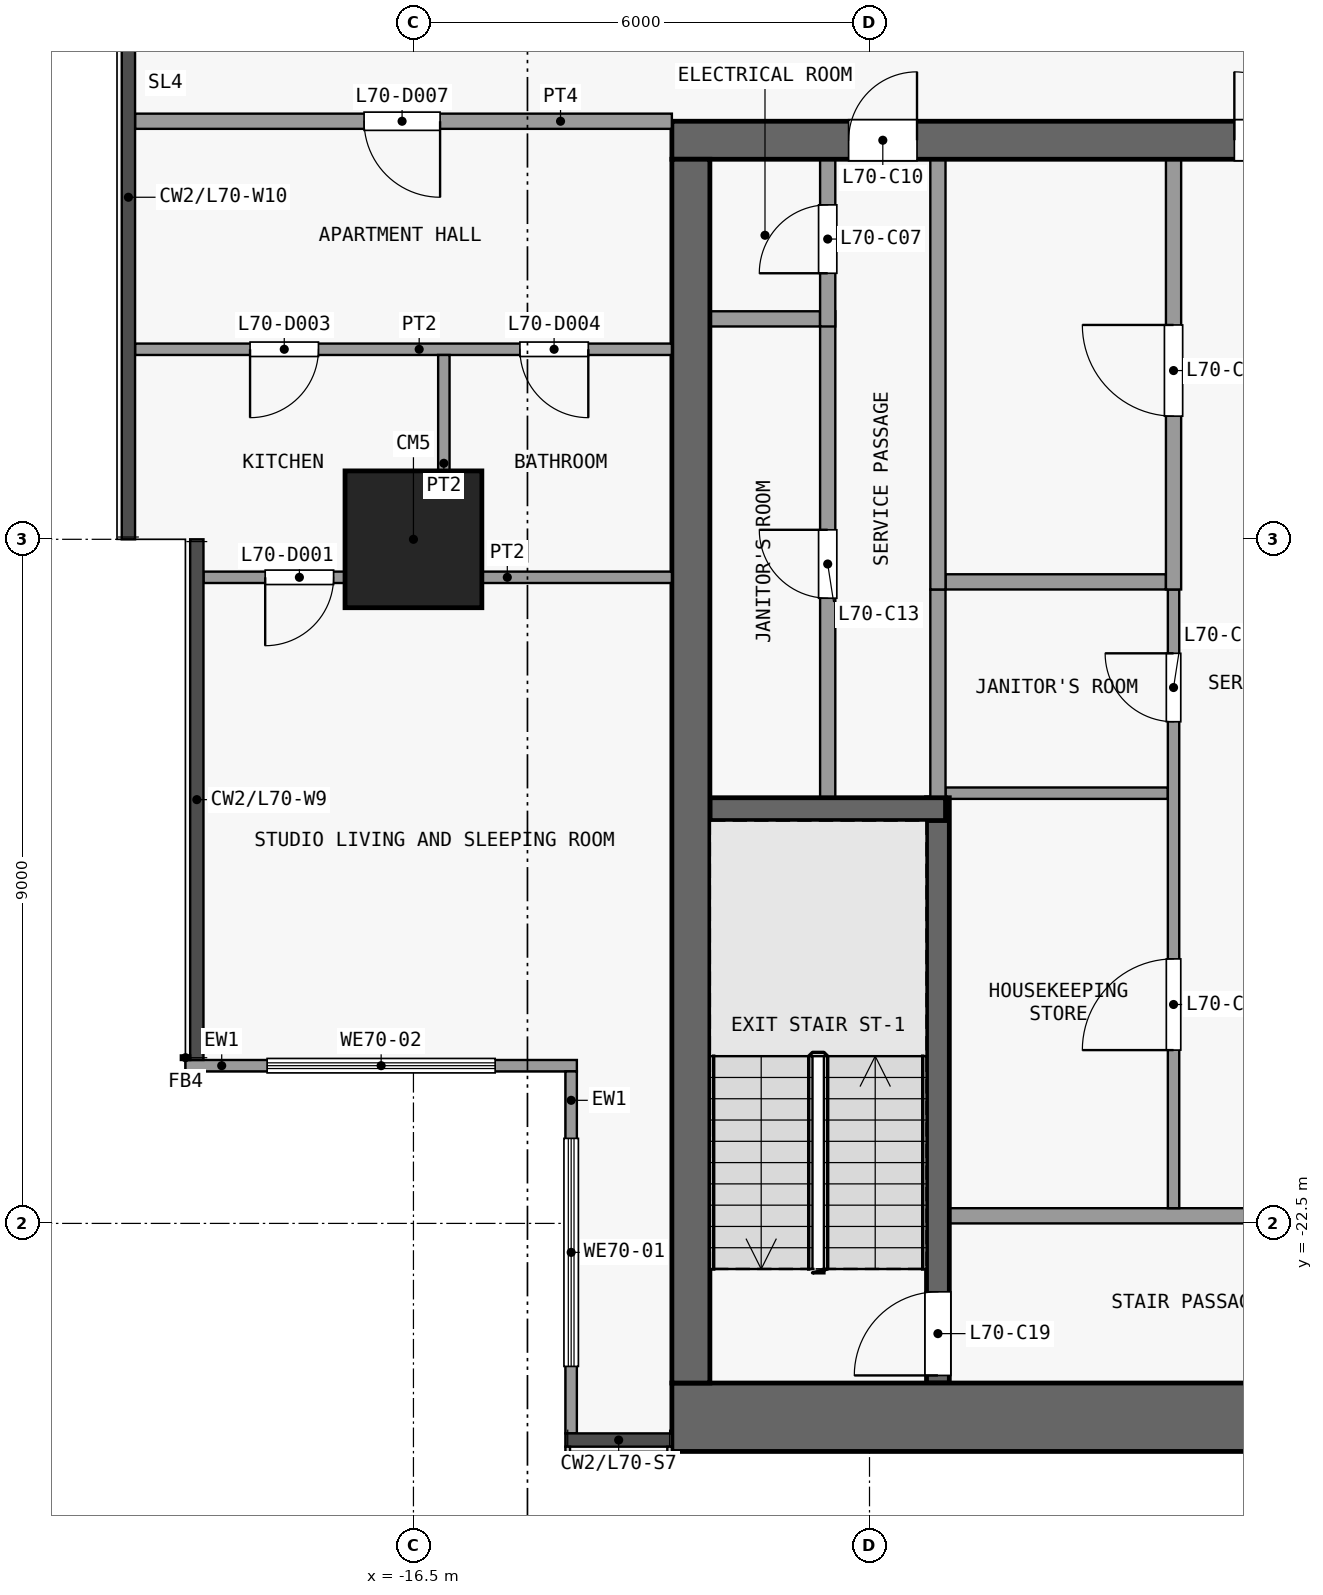
"""IFC4 building model, lengths in metres.
Left out: names, types, materials, properties, quantities, classifications, styles, units other than length and angle.
Written with IfcOpenShell. Run it as: python <this file> out.ifc"""

import sys

from ifc_helpers import new_model, si_unit, direction, frame, frame_2d, origin, origin_2d, place, context, subcontext, project, spatial, rectangle, extrude, element, fill, save


model = new_model("IFC4")
c1 = context("Model", 3, precision=1e-05, world=origin(), true_north=direction((0.0, 1.0)))
c2 = subcontext(c1, "Body", "Model", "MODEL_VIEW")
j1 = project(units=[si_unit("LENGTHUNIT", "METRE"), si_unit("PLANEANGLEUNIT", "RADIAN")], contexts=[c1])
p1 = place(None, origin())
s1 = spatial("IfcSite", under=j1, at=p1, CompositionType="ELEMENT")
p2 = place(p1, origin())
s2 = spatial("IfcBuilding", under=s1, at=p2, CompositionType="ELEMENT")
p3 = place(p2, frame((0.0, 0.0, 277.1)))
s3 = spatial("IfcBuildingStorey", under=s2, at=p3, CompositionType="ELEMENT", Elevation=277.1)
p4 = place(p3, frame((-16.5, -13.5, 0.0), z_axis=(0.0, 0.0, 1.0), x_axis=(1.0, 0.0, 0.0)))
e1 = element("IfcColumn", 1, at=p4, inside=s3, PredefinedType="COLUMN", context=c2, shape_type="SweptSolid", body=[
    extrude(rectangle(XDim=1.8, YDim=1.8, at=origin_2d()), origin(), (0.0, 0.0, 1.0), 3.6),
])
p5 = place(p3, frame((-13.1, -25.05, 0.0), z_axis=(0.0, 0.0, 1.0), x_axis=(1.0, 0.0, 0.0)))
e2 = element("IfcWall", 2, at=p5, inside=s3, PredefinedType="SHEAR", context=c2, shape_type="SweptSolid", body=[
    extrude(rectangle(XDim=26.2, YDim=0.9, at=frame_2d((13.1, 0.0))), origin(), (0.0, 0.0, 1.0), 3.3),
])
p6 = place(p3, frame((-13.1, -8.25, 0.0), z_axis=(0.0, 0.0, 1.0), x_axis=(1.0, 0.0, 0.0)))
e3 = element("IfcWall", 3, at=p6, inside=s3, PredefinedType="SHEAR", context=c2, shape_type="SweptSolid", body=[
    extrude(rectangle(XDim=26.2, YDim=0.5, at=frame_2d((13.1, 0.0))), origin(), (0.0, 0.0, 1.0), 3.3),
])
p7 = place(p6, frame((7.4, 0.0, 0.0)))
e4 = element("IfcOpeningElement", 4, at=p7, cuts=e3, PredefinedType="OPENING", context=c2, shape_type="SweptSolid", body=[
    extrude(rectangle(XDim=1.8, YDim=2.1, at=frame_2d((0.9, 1.05))), frame((0.0, 0.26, 0.0), z_axis=(0.0, -1.0, 0.0), x_axis=(1.0, 0.0, 0.0)), (0.0, 0.0, 1.0), 0.52),
])
p8 = place(p6, frame((17.0, 0.0, 0.0)))
e5 = element("IfcOpeningElement", 5, at=p8, cuts=e3, PredefinedType="OPENING", context=c2, shape_type="SweptSolid", body=[
    extrude(rectangle(XDim=1.8, YDim=2.1, at=frame_2d((0.9, 1.05))), frame((0.0, 0.26, 0.0), z_axis=(0.0, -1.0, 0.0), x_axis=(1.0, 0.0, 0.0)), (0.0, 0.0, 1.0), 0.52),
])
p9 = place(p6, frame((2.325, 0.0, 0.0)))
e6 = element("IfcOpeningElement", 6, at=p9, cuts=e3, PredefinedType="OPENING", context=c2, shape_type="SweptSolid", body=[
    extrude(rectangle(XDim=0.9, YDim=2.1, at=frame_2d((0.45, 1.05))), frame((0.0, 0.26, 0.0), z_axis=(0.0, -1.0, 0.0), x_axis=(1.0, 0.0, 0.0)), (0.0, 0.0, 1.0), 0.52),
])
p10 = place(p6, frame((22.975, 0.0, 0.0)))
e7 = element("IfcOpeningElement", 7, at=p10, cuts=e3, PredefinedType="OPENING", context=c2, shape_type="SweptSolid", body=[
    extrude(rectangle(XDim=0.9, YDim=2.1, at=frame_2d((0.45, 1.05))), frame((0.0, 0.26, 0.0), z_axis=(0.0, -1.0, 0.0), x_axis=(1.0, 0.0, 0.0)), (0.0, 0.0, 1.0), 0.52),
])
p11 = place(p3, frame((-12.85, -24.6, 0.0), z_axis=(0.0, 0.0, 1.0), x_axis=(0.0, 1.0, 0.0)))
e8 = element("IfcWall", 8, at=p11, inside=s3, PredefinedType="SHEAR", context=c2, shape_type="SweptSolid", body=[
    extrude(rectangle(XDim=16.1, YDim=0.5, at=frame_2d((8.05, 0.0))), origin(), (0.0, 0.0, 1.0), 3.3),
])
p12 = place(p3, frame((-3.25, -22.4, 0.0), z_axis=(0.0, 0.0, 1.0), x_axis=(-1.0, 0.0, 0.0)))
e9 = element("IfcWall", 9, at=p12, inside=s3, PredefinedType="PARTITIONING", context=c2, shape_type="SweptSolid", body=[
    extrude(rectangle(XDim=6.2, YDim=0.2, at=frame_2d((3.1, 0.0))), origin(), (0.0, 0.0, 1.0), 3.3),
])
p13 = place(p12, frame((0.8, 0.0, 0.0)))
e10 = element("IfcOpeningElement", 10, at=p13, cuts=e9, PredefinedType="OPENING", context=c2, shape_type="SweptSolid", body=[
    extrude(rectangle(XDim=1.5, YDim=2.1, at=frame_2d((0.75, 1.05))), frame((0.0, 0.11, 0.0), z_axis=(0.0, -1.0, 0.0), x_axis=(1.0, 0.0, 0.0)), (0.0, 0.0, 1.0), 0.22),
])
p14 = place(p3, frame((-12.6, -17.05, 0.0), z_axis=(0.0, 0.0, 1.0), x_axis=(1.0, 0.0, 0.0)))
e11 = element("IfcWall", 11, at=p14, inside=s3, PredefinedType="SHEAR", context=c2, shape_type="SweptSolid", body=[
    extrude(rectangle(XDim=3.1, YDim=0.3, at=frame_2d((1.55, 0.0))), origin(), (0.0, 0.0, 1.0), 3.3),
])
p15 = place(p3, frame((-9.5, -16.84, 0.0), z_axis=(0.0, 0.0, 1.0), x_axis=(1.0, 0.0, 0.0)))
e12 = element("IfcWall", 12, at=p15, inside=s3, PredefinedType="PARTITIONING", context=c2, shape_type="SweptSolid", body=[
    extrude(rectangle(XDim=2.925, YDim=0.15, at=frame_2d((1.462, 0.0))), origin(), (0.0, 0.0, 1.0), 3.3),
])
p16 = place(p3, frame((-9.5, -14.06, 0.0), z_axis=(0.0, 0.0, 1.0), x_axis=(1.0, 0.0, 0.0)))
e13 = element("IfcWall", 13, at=p16, inside=s3, PredefinedType="PARTITIONING", context=c2, shape_type="SweptSolid", body=[
    extrude(rectangle(XDim=2.9, YDim=0.2, at=frame_2d((1.45, 0.0))), origin(), (0.0, 0.0, 1.0), 3.3),
])
p17 = place(p3, frame((-12.6, -10.6, 0.0), z_axis=(0.0, 0.0, 1.0), x_axis=(1.0, 0.0, 0.0)))
e14 = element("IfcWall", 14, at=p17, inside=s3, PredefinedType="PARTITIONING", context=c2, shape_type="SweptSolid", body=[
    extrude(rectangle(XDim=1.45, YDim=0.2, at=frame_2d((0.725, 0.0))), origin(), (0.0, 0.0, 1.0), 3.3),
])
p18 = place(p3, frame((-11.05, -16.9, 0.0), z_axis=(0.0, 0.0, 1.0), x_axis=(0.0, 1.0, 0.0)))
e15 = element("IfcWall", 15, at=p18, inside=s3, PredefinedType="PARTITIONING", context=c2, shape_type="SweptSolid", body=[
    extrude(rectangle(XDim=6.4, YDim=0.2, at=frame_2d((3.2, 0.0))), origin(), (0.0, 0.0, 1.0), 3.3),
])
p19 = place(p18, frame((2.625, 0.0, 0.0)))
e16 = element("IfcOpeningElement", 16, at=p19, cuts=e15, PredefinedType="OPENING", context=c2, shape_type="SweptSolid", body=[
    extrude(rectangle(XDim=0.9, YDim=2.1, at=frame_2d((0.45, 1.05))), frame((0.0, 0.11, 0.0), z_axis=(0.0, -1.0, 0.0), x_axis=(1.0, 0.0, 0.0)), (0.0, 0.0, 1.0), 0.22),
])
p20 = place(p3, frame((-11.05, -10.7, 0.0), z_axis=(0.0, 0.0, 1.0), x_axis=(0.0, 1.0, 0.0)))
e17 = element("IfcWall", 17, at=p20, inside=s3, PredefinedType="PARTITIONING", context=c2, shape_type="SweptSolid", body=[
    extrude(rectangle(XDim=2.2, YDim=0.2, at=frame_2d((1.1, 0.0))), origin(), (0.0, 0.0, 1.0), 3.3),
])
p21 = place(p20, frame((0.7, 0.0, 0.0)))
e18 = element("IfcOpeningElement", 18, at=p21, cuts=e17, PredefinedType="OPENING", context=c2, shape_type="SweptSolid", body=[
    extrude(rectangle(XDim=0.9, YDim=2.1, at=frame_2d((0.45, 1.05))), frame((0.0, 0.11, 0.0), z_axis=(0.0, -1.0, 0.0), x_axis=(1.0, 0.0, 0.0)), (0.0, 0.0, 1.0), 0.22),
])
p22 = place(p3, frame((-9.6, -24.6, 0.0), z_axis=(0.0, 0.0, 1.0), x_axis=(0.0, 1.0, 0.0)))
e19 = element("IfcWall", 19, at=p22, inside=s3, PredefinedType="SHEAR", context=c2, shape_type="SweptSolid", body=[
    extrude(rectangle(XDim=7.7, YDim=0.3, at=frame_2d((3.85, 0.0))), origin(), (0.0, 0.0, 1.0), 3.3),
])
p23 = place(p22, frame((0.1, 0.0, 0.0)))
e20 = element("IfcOpeningElement", 20, at=p23, cuts=e19, PredefinedType="OPENING", context=c2, shape_type="SweptSolid", body=[
    extrude(rectangle(XDim=1.1, YDim=2.1, at=frame_2d((0.55, 1.05))), frame((0.0, 0.16, 0.0), z_axis=(0.0, -1.0, 0.0), x_axis=(1.0, 0.0, 0.0)), (0.0, 0.0, 1.0), 0.32),
])
p24 = place(p3, frame((-9.6, -16.9, 0.0), z_axis=(0.0, 0.0, 1.0), x_axis=(0.0, 1.0, 0.0)))
e21 = element("IfcWall", 21, at=p24, inside=s3, PredefinedType="PARTITIONING", context=c2, shape_type="SweptSolid", body=[
    extrude(rectangle(XDim=2.74, YDim=0.2, at=frame_2d((1.37, 0.0))), origin(), (0.0, 0.0, 1.0), 3.3),
])
p25 = place(p3, frame((-9.6, -14.16, 0.0), z_axis=(0.0, 0.0, 1.0), x_axis=(0.0, 1.0, 0.0)))
e22 = element("IfcWall", 22, at=p25, inside=s3, PredefinedType="PARTITIONING", context=c2, shape_type="SweptSolid", body=[
    extrude(rectangle(XDim=5.66, YDim=0.2, at=frame_2d((2.83, 0.0))), origin(), (0.0, 0.0, 1.0), 3.3),
])
p26 = place(p3, frame((-6.5, -22.3, 0.0), z_axis=(0.0, 0.0, 1.0), x_axis=(0.0, 1.0, 0.0)))
e23 = element("IfcWall", 23, at=p26, inside=s3, PredefinedType="PARTITIONING", context=c2, shape_type="SweptSolid", body=[
    extrude(rectangle(XDim=8.14, YDim=0.15, at=frame_2d((4.07, 0.0))), origin(), (0.0, 0.0, 1.0), 3.3),
])
p27 = place(p26, frame((2.08, 0.0, 0.0)))
e24 = element("IfcOpeningElement", 24, at=p27, cuts=e23, PredefinedType="OPENING", context=c2, shape_type="SweptSolid", body=[
    extrude(rectangle(XDim=1.2, YDim=2.1, at=frame_2d((0.6, 1.05))), frame((0.0, 0.085, 0.0), z_axis=(0.0, -1.0, 0.0), x_axis=(1.0, 0.0, 0.0)), (0.0, 0.0, 1.0), 0.17),
])
p28 = place(p26, frame((6.4, 0.0, 0.0)))
e25 = element("IfcOpeningElement", 25, at=p28, cuts=e23, PredefinedType="OPENING", context=c2, shape_type="SweptSolid", body=[
    extrude(rectangle(XDim=0.9, YDim=2.1, at=frame_2d((0.45, 1.05))), frame((0.0, 0.085, 0.0), z_axis=(0.0, -1.0, 0.0), x_axis=(1.0, 0.0, 0.0)), (0.0, 0.0, 1.0), 0.17),
])
p29 = place(p3, frame((-6.5, -14.16, 0.0), z_axis=(0.0, 0.0, 1.0), x_axis=(0.0, 1.0, 0.0)))
e26 = element("IfcWall", 26, at=p29, inside=s3, PredefinedType="PARTITIONING", context=c2, shape_type="SweptSolid", body=[
    extrude(rectangle(XDim=5.66, YDim=0.2, at=frame_2d((2.83, 0.0))), origin(), (0.0, 0.0, 1.0), 3.3),
])
p30 = place(p29, frame((2.28, 0.0, 0.0)))
e27 = element("IfcOpeningElement", 27, at=p30, cuts=e26, PredefinedType="OPENING", context=c2, shape_type="SweptSolid", body=[
    extrude(rectangle(XDim=1.2, YDim=2.1, at=frame_2d((0.6, 1.05))), frame((0.0, 0.11, 0.0), z_axis=(0.0, -1.0, 0.0), x_axis=(1.0, 0.0, 0.0)), (0.0, 0.0, 1.0), 0.22),
])
p31 = place(p3, frame((-14.425, -25.262, 0.0), z_axis=(0.0, 0.0, 1.0), x_axis=(0.0, 1.0, 0.0)))
e28 = element("IfcWall", 28, at=p31, inside=s3, PredefinedType="SOLIDWALL", context=c2, shape_type="SweptSolid", body=[
    extrude(rectangle(XDim=4.762, YDim=0.15, at=frame_2d((2.381, 0.0))), origin(), (0.0, 0.0, 1.0), 3.3),
])
p32 = place(p31, frame((0.881, 0.0, 0.9)))
e29 = element("IfcOpeningElement", 29, at=p32, cuts=e28, PredefinedType="OPENING", context=c2, shape_type="SweptSolid", body=[
    extrude(rectangle(XDim=3.0, YDim=2.4, at=frame_2d((1.5, 1.2))), frame((0.0, 0.085, 0.0), z_axis=(0.0, -1.0, 0.0), x_axis=(1.0, 0.0, 0.0)), (0.0, 0.0, 1.0), 0.17),
])
p33 = place(p3, frame((-14.35, -20.425, 0.0), z_axis=(0.0, 0.0, 1.0), x_axis=(-1.0, 0.0, 0.0)))
e30 = element("IfcWall", 30, at=p33, inside=s3, PredefinedType="SOLIDWALL", context=c2, shape_type="SweptSolid", body=[
    extrude(rectangle(XDim=5.15, YDim=0.15, at=frame_2d((2.575, 0.0))), origin(), (0.0, 0.0, 1.0), 3.3),
])
p34 = place(p33, frame((1.075, 0.0, 0.9)))
e31 = element("IfcOpeningElement", 31, at=p34, cuts=e30, PredefinedType="OPENING", context=c2, shape_type="SweptSolid", body=[
    extrude(rectangle(XDim=3.0, YDim=2.4, at=frame_2d((1.5, 1.2))), frame((0.0, 0.085, 0.0), z_axis=(0.0, -1.0, 0.0), x_axis=(1.0, 0.0, 0.0)), (0.0, 0.0, 1.0), 0.17),
])
p35 = place(p3, frame((-19.262, -14.0, 0.0), z_axis=(0.0, 0.0, 1.0), x_axis=(1.0, 0.0, 0.0)))
e32 = element("IfcWall", 32, at=p35, inside=s3, PredefinedType="PARTITIONING", context=c2, shape_type="SweptSolid", body=[
    extrude(rectangle(XDim=6.162, YDim=0.15, at=frame_2d((3.081, 0.0))), origin(), (0.0, 0.0, 1.0), 3.3),
])
p36 = place(p35, frame((0.812, 0.0, 0.0)))
e33 = element("IfcOpeningElement", 33, at=p36, cuts=e32, PredefinedType="OPENING", context=c2, shape_type="SweptSolid", body=[
    extrude(rectangle(XDim=0.9, YDim=2.1, at=frame_2d((0.45, 1.05))), frame((0.0, 0.085, 0.0), z_axis=(0.0, -1.0, 0.0), x_axis=(1.0, 0.0, 0.0)), (0.0, 0.0, 1.0), 0.17),
])
p37 = place(p3, frame((-20.163, -11.0, 0.0), z_axis=(0.0, 0.0, 1.0), x_axis=(1.0, 0.0, 0.0)))
e34 = element("IfcWall", 34, at=p37, inside=s3, PredefinedType="PARTITIONING", context=c2, shape_type="SweptSolid", body=[
    extrude(rectangle(XDim=7.062, YDim=0.15, at=frame_2d((3.531, 0.0))), origin(), (0.0, 0.0, 1.0), 3.3),
])
p38 = place(p37, frame((1.513, 0.0, 0.0)))
e35 = element("IfcOpeningElement", 35, at=p38, cuts=e34, PredefinedType="OPENING", context=c2, shape_type="SweptSolid", body=[
    extrude(rectangle(XDim=0.9, YDim=2.1, at=frame_2d((0.45, 1.05))), frame((0.0, 0.085, 0.0), z_axis=(0.0, -1.0, 0.0), x_axis=(1.0, 0.0, 0.0)), (0.0, 0.0, 1.0), 0.17),
])
p39 = place(p37, frame((5.063, 0.0, 0.0)))
e36 = element("IfcOpeningElement", 36, at=p39, cuts=e34, PredefinedType="OPENING", context=c2, shape_type="SweptSolid", body=[
    extrude(rectangle(XDim=0.9, YDim=2.1, at=frame_2d((0.45, 1.05))), frame((0.0, 0.085, 0.0), z_axis=(0.0, -1.0, 0.0), x_axis=(1.0, 0.0, 0.0)), (0.0, 0.0, 1.0), 0.17),
])
p40 = place(p3, frame((-20.163, -8.0, 0.0), z_axis=(0.0, 0.0, 1.0), x_axis=(1.0, 0.0, 0.0)))
e37 = element("IfcWall", 37, at=p40, inside=s3, PredefinedType="PARTITIONING", context=c2, shape_type="SweptSolid", body=[
    extrude(rectangle(XDim=7.062, YDim=0.2, at=frame_2d((3.531, 0.0))), origin(), (0.0, 0.0, 1.0), 3.3),
])
p41 = place(p40, frame((3.013, 0.0, 0.0)))
e38 = element("IfcOpeningElement", 38, at=p41, cuts=e37, PredefinedType="OPENING", context=c2, shape_type="SweptSolid", body=[
    extrude(rectangle(XDim=1.0, YDim=2.1, at=frame_2d((0.5, 1.05))), frame((0.0, 0.11, 0.0), z_axis=(0.0, -1.0, 0.0), x_axis=(1.0, 0.0, 0.0)), (0.0, 0.0, 1.0), 0.22),
])
p42 = place(p3, frame((-16.1, -13.925, 0.0), z_axis=(0.0, 0.0, 1.0), x_axis=(0.0, 1.0, 0.0)))
e39 = element("IfcWall", 39, at=p42, inside=s3, PredefinedType="PARTITIONING", context=c2, shape_type="SweptSolid", body=[
    extrude(rectangle(XDim=2.85, YDim=0.15, at=frame_2d((1.425, 0.0))), origin(), (0.0, 0.0, 1.0), 3.3),
])
p43 = place(p7, origin())
e40 = element("IfcDoor", 40, at=p43, inside=s3, OperationType="DOUBLE_DOOR_SINGLE_SWING", PredefinedType="DOOR", context=c2, shape_type="SweptSolid", body=[
    extrude(rectangle(XDim=1.8, YDim=2.1, at=frame_2d((0.9, 1.05))), frame((0.0, 0.025, 0.0), z_axis=(0.0, -1.0, 0.0), x_axis=(1.0, 0.0, 0.0)), (0.0, 0.0, 1.0), 0.05),
])
fill(e4, e40)
p44 = place(p21, origin())
e41 = element("IfcDoor", 41, at=p44, inside=s3, OperationType="SINGLE_SWING_LEFT", PredefinedType="DOOR", context=c2, shape_type="SweptSolid", body=[
    extrude(rectangle(XDim=0.9, YDim=2.1, at=frame_2d((0.45, 1.05))), frame((0.0, 0.025, 0.0), z_axis=(0.0, -1.0, 0.0), x_axis=(1.0, 0.0, 0.0)), (0.0, 0.0, 1.0), 0.05),
])
fill(e18, e41)
p45 = place(p30, origin())
e42 = element("IfcDoor", 42, at=p45, inside=s3, OperationType="SINGLE_SWING_RIGHT", PredefinedType="DOOR", context=c2, shape_type="SweptSolid", body=[
    extrude(rectangle(XDim=1.2, YDim=2.1, at=frame_2d((0.6, 1.05))), frame((0.0, 0.025, 0.0), z_axis=(0.0, -1.0, 0.0), x_axis=(1.0, 0.0, 0.0)), (0.0, 0.0, 1.0), 0.05),
])
fill(e27, e42)
p46 = place(p9, origin())
e43 = element("IfcDoor", 43, at=p46, inside=s3, OperationType="SINGLE_SWING_RIGHT", PredefinedType="DOOR", context=c2, shape_type="SweptSolid", body=[
    extrude(rectangle(XDim=0.9, YDim=2.1, at=frame_2d((0.45, 1.05))), frame((0.0, 0.025, 0.0), z_axis=(0.0, -1.0, 0.0), x_axis=(1.0, 0.0, 0.0)), (0.0, 0.0, 1.0), 0.05),
])
fill(e6, e43)
p47 = place(p19, origin())
e44 = element("IfcDoor", 44, at=p47, inside=s3, OperationType="SINGLE_SWING_RIGHT", PredefinedType="DOOR", context=c2, shape_type="SweptSolid", body=[
    extrude(rectangle(XDim=0.9, YDim=2.1, at=frame_2d((0.45, 1.05))), frame((0.0, 0.025, 0.0), z_axis=(0.0, -1.0, 0.0), x_axis=(1.0, 0.0, 0.0)), (0.0, 0.0, 1.0), 0.05),
])
fill(e16, e44)
p48 = place(p27, origin())
e45 = element("IfcDoor", 45, at=p48, inside=s3, OperationType="SINGLE_SWING_LEFT", PredefinedType="DOOR", context=c2, shape_type="SweptSolid", body=[
    extrude(rectangle(XDim=1.2, YDim=2.1, at=frame_2d((0.6, 1.05))), frame((0.0, 0.025, 0.0), z_axis=(0.0, -1.0, 0.0), x_axis=(1.0, 0.0, 0.0)), (0.0, 0.0, 1.0), 0.05),
])
fill(e24, e45)
p49 = place(p28, origin())
e46 = element("IfcDoor", 46, at=p49, inside=s3, OperationType="SINGLE_SWING_RIGHT", PredefinedType="DOOR", context=c2, shape_type="SweptSolid", body=[
    extrude(rectangle(XDim=0.9, YDim=2.1, at=frame_2d((0.45, 1.05))), frame((0.0, 0.025, 0.0), z_axis=(0.0, -1.0, 0.0), x_axis=(1.0, 0.0, 0.0)), (0.0, 0.0, 1.0), 0.05),
])
fill(e25, e46)
p50 = place(p23, origin())
e47 = element("IfcDoor", 47, at=p50, inside=s3, OperationType="SINGLE_SWING_LEFT", PredefinedType="DOOR", context=c2, shape_type="SweptSolid", body=[
    extrude(rectangle(XDim=1.1, YDim=2.1, at=frame_2d((0.55, 1.05))), frame((0.0, 0.025, 0.0), z_axis=(0.0, -1.0, 0.0), x_axis=(1.0, 0.0, 0.0)), (0.0, 0.0, 1.0), 0.05),
])
fill(e20, e47)
p51 = place(p32, origin())
e48 = element("IfcWindow", 48, at=p51, inside=s3, PartitioningType="SINGLE_PANEL", PredefinedType="WINDOW", context=c2, shape_type="SweptSolid", body=[
    extrude(rectangle(XDim=3.0, YDim=2.4, at=frame_2d((1.5, 1.2))), frame((0.0, 0.03, 0.0), z_axis=(0.0, -1.0, 0.0), x_axis=(1.0, 0.0, 0.0)), (0.0, 0.0, 1.0), 0.06),
])
fill(e29, e48)
p52 = place(p34, origin())
e49 = element("IfcWindow", 49, at=p52, inside=s3, PartitioningType="SINGLE_PANEL", PredefinedType="WINDOW", context=c2, shape_type="SweptSolid", body=[
    extrude(rectangle(XDim=3.0, YDim=2.4, at=frame_2d((1.5, 1.2))), frame((0.0, 0.03, 0.0), z_axis=(0.0, -1.0, 0.0), x_axis=(1.0, 0.0, 0.0)), (0.0, 0.0, 1.0), 0.06),
])
fill(e31, e49)
p53 = place(p36, origin())
e50 = element("IfcDoor", 50, at=p53, inside=s3, OperationType="SINGLE_SWING_LEFT", PredefinedType="DOOR", context=c2, shape_type="SweptSolid", body=[
    extrude(rectangle(XDim=0.9, YDim=2.1, at=frame_2d((0.45, 1.05))), frame((0.0, 0.025, 0.0), z_axis=(0.0, -1.0, 0.0), x_axis=(1.0, 0.0, 0.0)), (0.0, 0.0, 1.0), 0.05),
])
fill(e33, e50)
p54 = place(p38, origin())
e51 = element("IfcDoor", 51, at=p54, inside=s3, OperationType="SINGLE_SWING_LEFT", PredefinedType="DOOR", context=c2, shape_type="SweptSolid", body=[
    extrude(rectangle(XDim=0.9, YDim=2.1, at=frame_2d((0.45, 1.05))), frame((0.0, 0.025, 0.0), z_axis=(0.0, -1.0, 0.0), x_axis=(1.0, 0.0, 0.0)), (0.0, 0.0, 1.0), 0.05),
])
fill(e35, e51)
p55 = place(p39, origin())
e52 = element("IfcDoor", 52, at=p55, inside=s3, OperationType="SINGLE_SWING_RIGHT", PredefinedType="DOOR", context=c2, shape_type="SweptSolid", body=[
    extrude(rectangle(XDim=0.9, YDim=2.1, at=frame_2d((0.45, 1.05))), frame((0.0, 0.025, 0.0), z_axis=(0.0, -1.0, 0.0), x_axis=(1.0, 0.0, 0.0)), (0.0, 0.0, 1.0), 0.05),
])
fill(e36, e52)
p56 = place(p41, origin())
e53 = element("IfcDoor", 53, at=p56, inside=s3, OperationType="SINGLE_SWING_RIGHT", PredefinedType="DOOR", context=c2, shape_type="SweptSolid", body=[
    extrude(rectangle(XDim=1.0, YDim=2.1, at=frame_2d((0.5, 1.05))), frame((0.0, 0.025, 0.0), z_axis=(0.0, -1.0, 0.0), x_axis=(1.0, 0.0, 0.0)), (0.0, 0.0, 1.0), 0.05),
])
fill(e38, e53)
save(model, sys.argv[1])
